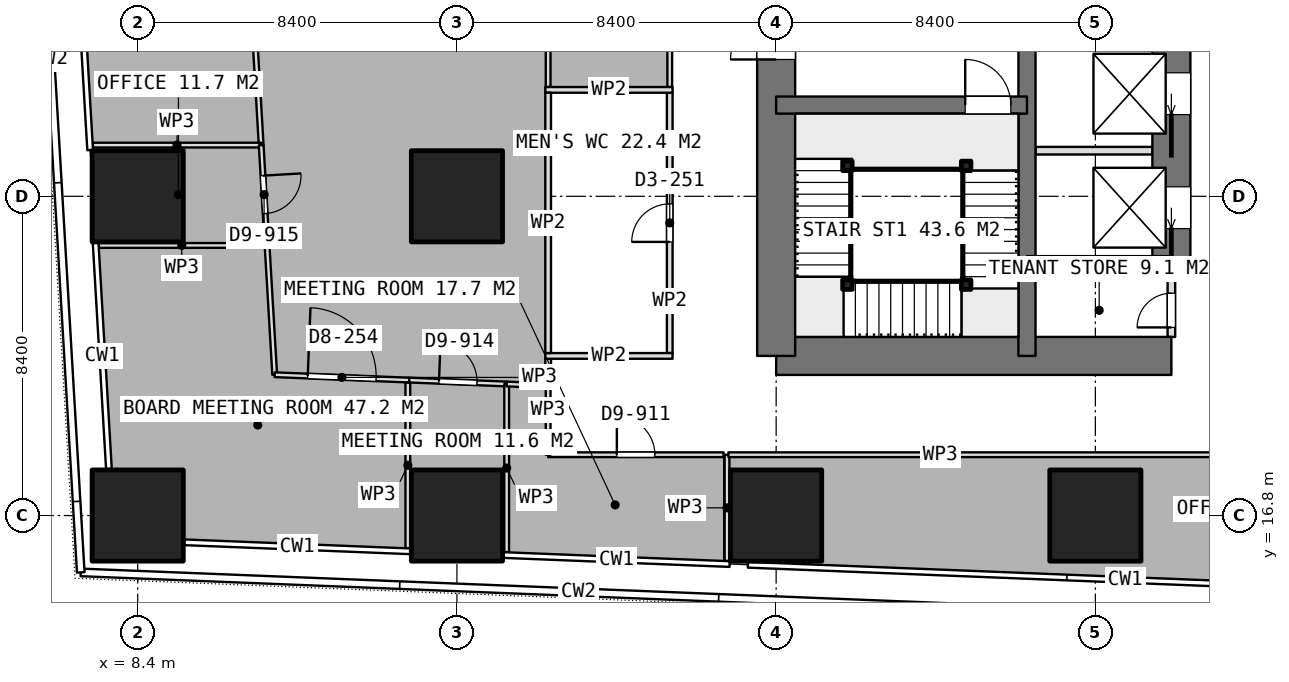
"""IFC4 building model, lengths in metres.
Left out: names, types, materials, properties, quantities, classifications, styles, units other than length and angle.
Written with IfcOpenShell. Run it as: python <this file> out.ifc"""

import sys

from ifc_helpers import new_model, si_unit, direction, frame, frame_2d, origin, origin_2d, place, context, subcontext, project, spatial, rectangle, extrude, element, fill, save


model = new_model("IFC4")
c1 = context("Model", 3, precision=1e-05, world=origin(), true_north=direction((0.0, 1.0)))
c2 = subcontext(c1, "Body", "Model", "MODEL_VIEW")
j1 = project(units=[si_unit("LENGTHUNIT", "METRE"), si_unit("PLANEANGLEUNIT", "RADIAN")], contexts=[c1])
p1 = place(None, origin())
s1 = spatial("IfcSite", under=j1, at=p1, CompositionType="ELEMENT")
p2 = place(p1, origin())
s2 = spatial("IfcBuilding", under=s1, at=p2, CompositionType="ELEMENT")
p3 = place(p2, frame((0.0, 0.0, 232.7)))
s3 = spatial("IfcBuildingStorey", under=s2, at=p3, CompositionType="ELEMENT", Elevation=232.7)
p4 = place(p3, frame((25.2, 21.0, 0.0), z_axis=(0.0, 0.0, 1.0), x_axis=(1.0, 0.0, 0.0)))
e1 = element("IfcWall", 1, at=p4, inside=s3, PredefinedType="SHEAR", context=c2, shape_type="SweptSolid", body=[
    extrude(rectangle(XDim=10.4, YDim=1.0, at=frame_2d((5.2, 0.0))), origin(), (0.0, 0.0, 1.0), 3.75),
])
p5 = place(p3, frame((25.2, 21.0, 0.0), z_axis=(0.0, 0.0, 1.0), x_axis=(0.0, 1.0, 0.0)))
e2 = element("IfcWall", 2, at=p5, inside=s3, PredefinedType="SHEAR", context=c2, shape_type="SweptSolid", body=[
    extrude(rectangle(XDim=25.2, YDim=1.0, at=frame_2d((12.6, 0.0))), origin(), (0.0, 0.0, 1.0), 3.75),
])
p6 = place(p5, frame((7.8, 0.0, 0.0)))
e3 = element("IfcOpeningElement", 3, at=p6, cuts=e2, PredefinedType="OPENING", context=c2, shape_type="SweptSolid", body=[
    extrude(rectangle(XDim=1.2, YDim=2.1, at=frame_2d((0.6, 1.05))), frame((0.0, 0.51, 0.0), z_axis=(0.0, -1.0, 0.0), x_axis=(1.0, 0.0, 0.0)), (0.0, 0.0, 1.0), 1.02),
])
p7 = place(p5, frame((14.25, 0.0, 0.0)))
e4 = element("IfcOpeningElement", 4, at=p7, cuts=e2, PredefinedType="OPENING", context=c2, shape_type="SweptSolid", body=[
    extrude(rectangle(XDim=0.9, YDim=2.1, at=frame_2d((0.45, 1.05))), frame((0.0, 0.51, 0.0), z_axis=(0.0, -1.0, 0.0), x_axis=(1.0, 0.0, 0.0)), (0.0, 0.0, 1.0), 1.02),
])
p8 = place(p5, frame((16.85, 0.0, 0.0)))
e5 = element("IfcOpeningElement", 5, at=p8, cuts=e2, PredefinedType="OPENING", context=c2, shape_type="SweptSolid", body=[
    extrude(rectangle(XDim=0.9, YDim=2.1, at=frame_2d((0.45, 1.05))), frame((0.0, 0.51, 0.0), z_axis=(0.0, -1.0, 0.0), x_axis=(1.0, 0.0, 0.0)), (0.0, 0.0, 1.0), 1.02),
])
p9 = place(p5, frame((19.025, 0.0, 0.0)))
e6 = element("IfcOpeningElement", 6, at=p9, cuts=e2, PredefinedType="OPENING", context=c2, shape_type="SweptSolid", body=[
    extrude(rectangle(XDim=1.2, YDim=2.1, at=frame_2d((0.6, 1.05))), frame((0.0, 0.51, 0.0), z_axis=(0.0, -1.0, 0.0), x_axis=(1.0, 0.0, 0.0)), (0.0, 0.0, 1.0), 1.02),
])
p10 = place(p3, frame((31.8, 21.0, 0.0), z_axis=(0.0, 0.0, 1.0), x_axis=(0.0, 1.0, 0.0)))
e7 = element("IfcWall", 7, at=p10, inside=s3, PredefinedType="SHEAR", context=c2, shape_type="SweptSolid", body=[
    extrude(rectangle(XDim=25.2, YDim=0.45, at=frame_2d((12.6, 0.0))), origin(), (0.0, 0.0, 1.0), 3.75),
])
p11 = place(p3, frame((35.6, 23.4, 0.0), z_axis=(0.0, 0.0, 1.0), x_axis=(0.0, 1.0, 0.0)))
e8 = element("IfcWall", 8, at=p11, inside=s3, PredefinedType="SHEAR", context=c2, shape_type="SweptSolid", body=[
    extrude(rectangle(XDim=18.0, YDim=1.0, at=frame_2d((9.0, 0.0))), origin(), (0.0, 0.0, 1.0), 3.75),
])
p12 = place(p11, frame((0.95, 0.0, 0.0)))
e9 = element("IfcOpeningElement", 9, at=p12, cuts=e8, PredefinedType="OPENING", context=c2, shape_type="SweptSolid", body=[
    extrude(rectangle(XDim=1.1, YDim=2.1, at=frame_2d((0.55, 1.05))), frame((0.0, 0.51, 0.0), z_axis=(0.0, -1.0, 0.0), x_axis=(1.0, 0.0, 0.0)), (0.0, 0.0, 1.0), 1.02),
])
p13 = place(p11, frame((3.95, 0.0, 0.0)))
e10 = element("IfcOpeningElement", 10, at=p13, cuts=e8, PredefinedType="OPENING", context=c2, shape_type="SweptSolid", body=[
    extrude(rectangle(XDim=1.1, YDim=2.1, at=frame_2d((0.55, 1.05))), frame((0.0, 0.51, 0.0), z_axis=(0.0, -1.0, 0.0), x_axis=(1.0, 0.0, 0.0)), (0.0, 0.0, 1.0), 1.02),
])
p14 = place(p11, frame((6.95, 0.0, 0.0)))
e11 = element("IfcOpeningElement", 11, at=p14, cuts=e8, PredefinedType="OPENING", context=c2, shape_type="SweptSolid", body=[
    extrude(rectangle(XDim=1.1, YDim=2.1, at=frame_2d((0.55, 1.05))), frame((0.0, 0.51, 0.0), z_axis=(0.0, -1.0, 0.0), x_axis=(1.0, 0.0, 0.0)), (0.0, 0.0, 1.0), 1.02),
])
p15 = place(p11, frame((9.95, 0.0, 0.0)))
e12 = element("IfcOpeningElement", 12, at=p15, cuts=e8, PredefinedType="OPENING", context=c2, shape_type="SweptSolid", body=[
    extrude(rectangle(XDim=1.1, YDim=2.1, at=frame_2d((0.55, 1.05))), frame((0.0, 0.51, 0.0), z_axis=(0.0, -1.0, 0.0), x_axis=(1.0, 0.0, 0.0)), (0.0, 0.0, 1.0), 1.02),
])
p16 = place(p11, frame((12.95, 0.0, 0.0)))
e13 = element("IfcOpeningElement", 13, at=p16, cuts=e8, PredefinedType="OPENING", context=c2, shape_type="SweptSolid", body=[
    extrude(rectangle(XDim=1.1, YDim=2.1, at=frame_2d((0.55, 1.05))), frame((0.0, 0.51, 0.0), z_axis=(0.0, -1.0, 0.0), x_axis=(1.0, 0.0, 0.0)), (0.0, 0.0, 1.0), 1.02),
])
p17 = place(p11, frame((15.95, 0.0, 0.0)))
e14 = element("IfcOpeningElement", 14, at=p17, cuts=e8, PredefinedType="OPENING", context=c2, shape_type="SweptSolid", body=[
    extrude(rectangle(XDim=1.1, YDim=2.1, at=frame_2d((0.55, 1.05))), frame((0.0, 0.51, 0.0), z_axis=(0.0, -1.0, 0.0), x_axis=(1.0, 0.0, 0.0)), (0.0, 0.0, 1.0), 1.02),
])
p18 = place(p3, frame((31.8, 23.4, 0.0), z_axis=(0.0, 0.0, 1.0), x_axis=(1.0, 0.0, 0.0)))
e15 = element("IfcWall", 15, at=p18, inside=s3, PredefinedType="SHEAR", context=c2, shape_type="SweptSolid", body=[
    extrude(rectangle(XDim=3.8, YDim=0.45, at=frame_2d((1.9, 0.0))), origin(), (0.0, 0.0, 1.0), 3.75),
])
p19 = place(p3, frame((25.2, 27.6, 0.0), z_axis=(0.0, 0.0, 1.0), x_axis=(1.0, 0.0, 0.0)))
e16 = element("IfcWall", 16, at=p19, inside=s3, PredefinedType="SHEAR", context=c2, shape_type="SweptSolid", body=[
    extrude(rectangle(XDim=6.6, YDim=0.45, at=frame_2d((3.3, 0.0))), origin(), (0.0, 0.0, 1.0), 3.75),
])
p20 = place(p19, frame((4.975, 0.0, 0.0)))
e17 = element("IfcOpeningElement", 17, at=p20, cuts=e16, PredefinedType="OPENING", context=c2, shape_type="SweptSolid", body=[
    extrude(rectangle(XDim=1.2, YDim=2.1, at=frame_2d((0.6, 1.05))), frame((0.0, 0.235, 0.0), z_axis=(0.0, -1.0, 0.0), x_axis=(1.0, 0.0, 0.0)), (0.0, 0.0, 1.0), 0.47),
])
for number, where, z_axis, x_axis in (
    (18, (8.4, 16.8, 0.0), (0.0, 0.0, 1.0), (1.0, 0.0, 0.0)),
    (19, (8.4, 25.2, 0.0), (0.0, 0.0, 1.0), (1.0, 0.0, 0.0)),
    (20, (16.8, 16.8, 0.0), (0.0, 0.0, 1.0), (1.0, 0.0, 0.0)),
    (21, (16.8, 25.2, 0.0), (0.0, 0.0, 1.0), (1.0, 0.0, 0.0)),
    (22, (25.2, 16.8, 0.0), (0.0, 0.0, 1.0), (1.0, 0.0, 0.0)),
    (23, (33.6, 16.8, 0.0), (0.0, 0.0, 1.0), (1.0, 0.0, 0.0)),
):
    element("IfcColumn", number, at=place(p3, frame(where, z_axis=z_axis, x_axis=x_axis)), inside=s3, PredefinedType="COLUMN", context=c2, shape_type="SweptSolid", body=[
        extrude(rectangle(XDim=2.4, YDim=2.4, at=origin_2d()), origin(), (0.0, 0.0, 1.0), 3.75),
    ])
p21 = place(p3, frame((32.025, 26.4, 0.0), z_axis=(0.0, 0.0, 1.0), x_axis=(1.0, 0.0, 0.0)))
e24 = element("IfcWall", 24, at=p21, inside=s3, PredefinedType="PARTITIONING", context=c2, shape_type="SweptSolid", body=[
    extrude(rectangle(XDim=3.075, YDim=0.2, at=frame_2d((1.538, 0.0))), origin(), (0.0, 0.0, 1.0), 3.5),
])
p22 = place(p3, frame((35.6, 21.5, 0.0), z_axis=(0.0, 0.0, 1.0), x_axis=(0.0, 1.0, 0.0)))
e25 = element("IfcWall", 25, at=p22, inside=s3, PredefinedType="PARTITIONING", context=c2, shape_type="SweptSolid", body=[
    extrude(rectangle(XDim=1.675, YDim=0.2, at=frame_2d((0.837, 0.0))), origin(), (0.0, 0.0, 1.0), 3.5),
])
p23 = place(p22, frame((0.25, 0.0, 0.0)))
e26 = element("IfcOpeningElement", 26, at=p23, cuts=e25, PredefinedType="OPENING", context=c2, shape_type="SweptSolid", body=[
    extrude(rectangle(XDim=0.9, YDim=2.1, at=frame_2d((0.45, 1.05))), frame((0.0, 0.11, 0.0), z_axis=(0.0, -1.0, 0.0), x_axis=(1.0, 0.0, 0.0)), (0.0, 0.0, 1.0), 0.22),
])
for number, where, z_axis, x_axis in (
    (27, (19.125, 21.0, 0.0), (0.0, 0.0, 1.0), (1.0, 0.0, 0.0)),
    (28, (19.125, 28.0, 0.0), (0.0, 0.0, 1.0), (1.0, 0.0, 0.0)),
):
    element("IfcWall", number, at=place(p3, frame(where, z_axis=z_axis, x_axis=x_axis)), inside=s3, PredefinedType="PARTITIONING", context=c2, shape_type="SweptSolid", body=[
        extrude(rectangle(XDim=3.35, YDim=0.15, at=frame_2d((1.675, 0.0))), origin(), (0.0, 0.0, 1.0), 3.5),
    ])
p24 = place(p3, frame((19.2, 21.075, 0.0), z_axis=(0.0, 0.0, 1.0), x_axis=(0.0, 1.0, 0.0)))
e29 = element("IfcWall", 29, at=p24, inside=s3, PredefinedType="PARTITIONING", context=c2, shape_type="SweptSolid", body=[
    extrude(rectangle(XDim=6.85, YDim=0.15, at=frame_2d((3.425, 0.0))), origin(), (0.0, 0.0, 1.0), 3.5),
])
p25 = place(p3, frame((22.4, 21.075, 0.0), z_axis=(0.0, 0.0, 1.0), x_axis=(0.0, 1.0, 0.0)))
e30 = element("IfcWall", 30, at=p25, inside=s3, PredefinedType="PARTITIONING", context=c2, shape_type="SweptSolid", body=[
    extrude(rectangle(XDim=6.85, YDim=0.15, at=frame_2d((3.425, 0.0))), origin(), (0.0, 0.0, 1.0), 3.5),
])
p26 = place(p25, frame((2.925, 0.0, 0.0)))
e31 = element("IfcOpeningElement", 31, at=p26, cuts=e30, PredefinedType="OPENING", context=c2, shape_type="SweptSolid", body=[
    extrude(rectangle(XDim=1.0, YDim=2.1, at=frame_2d((0.5, 1.05))), frame((0.0, 0.085, 0.0), z_axis=(0.0, -1.0, 0.0), x_axis=(1.0, 0.0, 0.0)), (0.0, 0.0, 1.0), 0.17),
])
p27 = place(p3, frame((23.907, 15.606, 0.0), z_axis=(0.0, 0.0, 1.0), x_axis=(0.0, 1.0, 0.0)))
e32 = element("IfcWall", 32, at=p27, inside=s3, PredefinedType="PARTITIONING", context=c2, shape_type="SweptSolid", body=[
    extrude(rectangle(XDim=2.794, YDim=0.125, at=frame_2d((1.397, 0.0))), origin(), (0.0, 0.0, 1.0), 3.5),
])
p28 = place(p3, frame((23.944, 18.4, 0.0), z_axis=(0.0, 0.0, 1.0), x_axis=(1.0, 0.0, 0.0)))
e33 = element("IfcWall", 33, at=p28, inside=s3, PredefinedType="PARTITIONING", context=c2, shape_type="SweptSolid", body=[
    extrude(rectangle(XDim=27.867, YDim=0.125, at=frame_2d((13.934, 0.0))), origin(), (0.0, 0.0, 1.0), 3.5),
])
p29 = place(p28, frame((13.433, 0.0, 0.0)))
e34 = element("IfcOpeningElement", 34, at=p29, cuts=e33, PredefinedType="OPENING", context=c2, shape_type="SweptSolid", body=[
    extrude(rectangle(XDim=1.0, YDim=2.1, at=frame_2d((0.5, 1.05))), frame((0.0, 0.073, 0.0), z_axis=(0.0, -1.0, 0.0), x_axis=(1.0, 0.0, 0.0)), (0.0, 0.0, 1.0), 0.145),
])
p30 = place(p3, frame((11.148, 35.06, 0.0), z_axis=(0.0, 0.0, 1.0), x_axis=(0.058747195918, -0.998272892035, 0.0)))
e35 = element("IfcWall", 35, at=p30, inside=s3, PredefinedType="PARTITIONING", context=c2, shape_type="SweptSolid", body=[
    extrude(rectangle(XDim=8.528, YDim=0.125, at=frame_2d((4.264, 0.0))), origin(), (0.0, 0.0, 1.0), 3.5),
])
p31 = place(p30, frame((3.364, 0.0, 0.0)))
e36 = element("IfcOpeningElement", 36, at=p31, cuts=e35, PredefinedType="OPENING", context=c2, shape_type="SweptSolid", body=[
    extrude(rectangle(XDim=1.8, YDim=2.1, at=frame_2d((0.9, 1.05))), frame((0.0, 0.073, 0.0), z_axis=(0.0, -1.0, 0.0), x_axis=(1.0, 0.0, 0.0)), (0.0, 0.0, 1.0), 0.145),
])
p32 = place(p3, frame((11.649, 26.547, 0.0), z_axis=(0.0, 0.0, 1.0), x_axis=(-1.0, 0.0, 0.0)))
e37 = element("IfcWall", 37, at=p32, inside=s3, PredefinedType="PARTITIONING", context=c2, shape_type="SweptSolid", body=[
    extrude(rectangle(XDim=4.428, YDim=0.125, at=frame_2d((2.214, 0.0))), origin(), (0.0, 0.0, 1.0), 3.5),
])
p33 = place(p3, frame((11.649, 26.546, 0.0), z_axis=(0.0, 0.0, 1.0), x_axis=(0.058711043696, -0.998275018894, 0.0)))
e38 = element("IfcWall", 38, at=p33, inside=s3, PredefinedType="PARTITIONING", context=c2, shape_type="SweptSolid", body=[
    extrude(rectangle(XDim=2.607, YDim=0.125, at=frame_2d((1.304, 0.0))), origin(), (0.0, 0.0, 1.0), 3.5),
])
p34 = place(p33, frame((0.804, 0.0, 0.0)))
e39 = element("IfcOpeningElement", 39, at=p34, cuts=e38, PredefinedType="OPENING", context=c2, shape_type="SweptSolid", body=[
    extrude(rectangle(XDim=1.0, YDim=2.1, at=frame_2d((0.5, 1.05))), frame((0.0, 0.073, 0.0), z_axis=(0.0, -1.0, 0.0), x_axis=(1.0, 0.0, 0.0)), (0.0, 0.0, 1.0), 0.145),
])
p35 = place(p3, frame((11.741, 23.907, 0.0), z_axis=(0.0, 0.0, 1.0), x_axis=(-1.0, 0.0, 0.0)))
e40 = element("IfcWall", 40, at=p35, inside=s3, PredefinedType="PARTITIONING", context=c2, shape_type="SweptSolid", body=[
    extrude(rectangle(XDim=4.364, YDim=0.125, at=frame_2d((2.182, 0.0))), origin(), (0.0, 0.0, 1.0), 3.5),
])
p36 = place(p3, frame((15.508, 20.303, 0.0), z_axis=(0.0, 0.0, 1.0), x_axis=(0.0, -1.0, 0.0)))
e41 = element("IfcWall", 41, at=p36, inside=s3, PredefinedType="PARTITIONING", context=c2, shape_type="SweptSolid", body=[
    extrude(rectangle(XDim=4.361, YDim=0.125, at=frame_2d((2.181, 0.0))), origin(), (0.0, 0.0, 1.0), 3.5),
])
p37 = place(p3, frame((11.802, 23.942, 0.0), z_axis=(0.0, 0.0, 1.0), x_axis=(0.058925701835, -0.998262371155, 0.0)))
e42 = element("IfcWall", 42, at=p37, inside=s3, PredefinedType="PARTITIONING", context=c2, shape_type="SweptSolid", body=[
    extrude(rectangle(XDim=3.443, YDim=0.125, at=frame_2d((1.722, 0.0))), origin(), (0.0, 0.0, 1.0), 3.5),
])
p38 = place(p3, frame((12.005, 20.505, 0.0), z_axis=(0.0, 0.0, 1.0), x_axis=(0.999208321211, -0.039783549637, 0.0)))
e43 = element("IfcWall", 43, at=p38, inside=s3, PredefinedType="PARTITIONING", context=c2, shape_type="SweptSolid", body=[
    extrude(rectangle(XDim=3.541, YDim=0.125, at=frame_2d((1.771, 0.0))), origin(), (0.0, 0.0, 1.0), 3.5),
])
p39 = place(p38, frame((0.87, 0.0, 0.0)))
e44 = element("IfcOpeningElement", 44, at=p39, cuts=e43, PredefinedType="OPENING", context=c2, shape_type="SweptSolid", body=[
    extrude(rectangle(XDim=1.8, YDim=2.1, at=frame_2d((0.9, 1.05))), frame((0.0, 0.073, 0.0), z_axis=(0.0, -1.0, 0.0), x_axis=(1.0, 0.0, 0.0)), (0.0, 0.0, 1.0), 0.145),
])
p40 = place(p3, frame((15.544, 20.364, 0.0), z_axis=(0.0, 0.0, 1.0), x_axis=(0.999194259908, -0.040135158736, 0.0)))
e45 = element("IfcWall", 45, at=p40, inside=s3, PredefinedType="PARTITIONING", context=c2, shape_type="SweptSolid", body=[
    extrude(rectangle(XDim=2.567, YDim=0.125, at=frame_2d((1.283, 0.0))), origin(), (0.0, 0.0, 1.0), 3.5),
])
p41 = place(p40, frame((0.784, 0.0, 0.0)))
e46 = element("IfcOpeningElement", 46, at=p41, cuts=e45, PredefinedType="OPENING", context=c2, shape_type="SweptSolid", body=[
    extrude(rectangle(XDim=1.0, YDim=2.1, at=frame_2d((0.5, 1.05))), frame((0.0, 0.073, 0.0), z_axis=(0.0, -1.0, 0.0), x_axis=(1.0, 0.0, 0.0)), (0.0, 0.0, 1.0), 0.145),
])
p42 = place(p3, frame((18.109, 20.261, 0.0), z_axis=(0.0, 0.0, 1.0), x_axis=(0.0, -1.0, 0.0)))
e47 = element("IfcWall", 47, at=p42, inside=s3, PredefinedType="PARTITIONING", context=c2, shape_type="SweptSolid", body=[
    extrude(rectangle(XDim=4.423, YDim=0.125, at=frame_2d((2.211, 0.0))), origin(), (0.0, 0.0, 1.0), 3.5),
])
p43 = place(p3, frame((19.2, 18.4, 0.0), z_axis=(0.0, 0.0, 1.0), x_axis=(1.0, 0.0, 0.0)))
e48 = element("IfcWall", 48, at=p43, inside=s3, PredefinedType="PARTITIONING", context=c2, shape_type="SweptSolid", body=[
    extrude(rectangle(XDim=4.617, YDim=0.125, at=frame_2d((2.309, 0.0))), origin(), (0.0, 0.0, 1.0), 3.5),
])
p44 = place(p43, frame((1.808, 0.0, 0.0)))
e49 = element("IfcOpeningElement", 49, at=p44, cuts=e48, PredefinedType="OPENING", context=c2, shape_type="SweptSolid", body=[
    extrude(rectangle(XDim=1.0, YDim=2.1, at=frame_2d((0.5, 1.05))), frame((0.0, 0.073, 0.0), z_axis=(0.0, -1.0, 0.0), x_axis=(1.0, 0.0, 0.0)), (0.0, 0.0, 1.0), 0.145),
])
p45 = place(p3, frame((18.11, 20.261, 0.0), z_axis=(0.0, 0.0, 1.0), x_axis=(0.999223679577, -0.039395915682, 0.0)))
e50 = element("IfcWall", 50, at=p45, inside=s3, PredefinedType="PARTITIONING", context=c2, shape_type="SweptSolid", body=[
    extrude(rectangle(XDim=1.091, YDim=0.125, at=frame_2d((0.545, 0.0))), origin(), (0.0, 0.0, 1.0), 3.5),
])
p46 = place(p3, frame((19.2, 20.218, 0.0), z_axis=(0.0, 0.0, 1.0), x_axis=(0.0, -1.0, 0.0)))
e51 = element("IfcWall", 51, at=p46, inside=s3, PredefinedType="PARTITIONING", context=c2, shape_type="SweptSolid", body=[
    extrude(rectangle(XDim=1.818, YDim=0.125, at=frame_2d((0.909, 0.0))), origin(), (0.0, 0.0, 1.0), 3.5),
])
p47 = place(p3, frame((19.2, 28.075, 0.0), z_axis=(0.0, 0.0, 1.0), x_axis=(0.0, 1.0, 0.0)))
e52 = element("IfcWall", 52, at=p47, inside=s3, PredefinedType="PARTITIONING", context=c2, shape_type="SweptSolid", body=[
    extrude(rectangle(XDim=25.075, YDim=0.125, at=frame_2d((12.538, 0.0))), origin(), (0.0, 0.0, 1.0), 3.5),
])
p48 = place(p3, frame((22.4, 53.15, 0.0), z_axis=(0.0, 0.0, 1.0), x_axis=(0.0, -1.0, 0.0)))
e53 = element("IfcWall", 53, at=p48, inside=s3, PredefinedType="PARTITIONING", context=c2, shape_type="SweptSolid", body=[
    extrude(rectangle(XDim=25.075, YDim=0.125, at=frame_2d((12.538, 0.0))), origin(), (0.0, 0.0, 1.0), 3.5),
])
p49 = place(p48, frame((11.675, 0.0, 0.0)))
e54 = element("IfcOpeningElement", 54, at=p49, cuts=e53, PredefinedType="OPENING", context=c2, shape_type="SweptSolid", body=[
    extrude(rectangle(XDim=1.8, YDim=2.1, at=frame_2d((0.9, 1.05))), frame((0.0, 0.073, 0.0), z_axis=(0.0, -1.0, 0.0), x_axis=(1.0, 0.0, 0.0)), (0.0, 0.0, 1.0), 0.145),
])
p50 = place(p3, frame((19.2, 20.925, 0.0), z_axis=(0.0, 0.0, 1.0), x_axis=(0.0, -1.0, 0.0)))
e55 = element("IfcWall", 55, at=p50, inside=s3, PredefinedType="PARTITIONING", context=c2, shape_type="SweptSolid", body=[
    extrude(rectangle(XDim=0.707, YDim=0.15, at=frame_2d((0.354, 0.0))), origin(), (0.0, 0.0, 1.0), 3.5),
])
for number, where, z_axis, x_axis in (
    (56, (30.2, 26.0, 0.0), (0.0, 0.0, 1.0), (1.0, 0.0, 0.0)),
    (57, (30.2, 22.875, 0.0), (0.0, 0.0, 1.0), (1.0, 0.0, 0.0)),
    (58, (27.075, 22.875, 0.0), (0.0, 0.0, 1.0), (1.0, 0.0, 0.0)),
    (59, (27.075, 26.0, 0.0), (0.0, 0.0, 1.0), (1.0, 0.0, 0.0)),
):
    element("IfcColumn", number, at=place(p3, frame(where, z_axis=z_axis, x_axis=x_axis)), inside=s3, PredefinedType="COLUMN", context=c2, shape_type="SweptSolid", body=[
        extrude(rectangle(XDim=0.25, YDim=0.25, at=origin_2d()), origin(), (0.0, 0.0, 1.0), 3.75),
    ])
p51 = place(p6, origin())
e60 = element("IfcDoor", 60, at=p51, inside=s3, OperationType="SINGLE_SWING_LEFT", PredefinedType="DOOR", context=c2, shape_type="SweptSolid", body=[
    extrude(rectangle(XDim=1.2, YDim=2.1, at=frame_2d((0.6, 1.05))), frame((0.0, 0.025, 0.0), z_axis=(0.0, -1.0, 0.0), x_axis=(1.0, 0.0, 0.0)), (0.0, 0.0, 1.0), 0.05),
])
fill(e3, e60)
p52 = place(p23, origin())
e61 = element("IfcDoor", 61, at=p52, inside=s3, OperationType="SINGLE_SWING_LEFT", PredefinedType="DOOR", context=c2, shape_type="SweptSolid", body=[
    extrude(rectangle(XDim=0.9, YDim=2.1, at=frame_2d((0.45, 1.05))), frame((0.0, 0.025, 0.0), z_axis=(0.0, -1.0, 0.0), x_axis=(1.0, 0.0, 0.0)), (0.0, 0.0, 1.0), 0.05),
])
fill(e26, e61)
p53 = place(p12, origin())
e62 = element("IfcDoor", 62, at=p53, inside=s3, OperationType="SLIDING_TO_LEFT", PredefinedType="USERDEFINED", context=c2, shape_type="SweptSolid", body=[
    extrude(rectangle(XDim=1.1, YDim=2.1, at=frame_2d((0.55, 1.05))), frame((0.0, 0.025, 0.0), z_axis=(0.0, -1.0, 0.0), x_axis=(1.0, 0.0, 0.0)), (0.0, 0.0, 1.0), 0.05),
])
fill(e9, e62)
p54 = place(p13, origin())
e63 = element("IfcDoor", 63, at=p54, inside=s3, OperationType="SLIDING_TO_LEFT", PredefinedType="USERDEFINED", context=c2, shape_type="SweptSolid", body=[
    extrude(rectangle(XDim=1.1, YDim=2.1, at=frame_2d((0.55, 1.05))), frame((0.0, 0.025, 0.0), z_axis=(0.0, -1.0, 0.0), x_axis=(1.0, 0.0, 0.0)), (0.0, 0.0, 1.0), 0.05),
])
fill(e10, e63)
p55 = place(p26, origin())
e64 = element("IfcDoor", 64, at=p55, inside=s3, OperationType="SINGLE_SWING_LEFT", PredefinedType="DOOR", context=c2, shape_type="SweptSolid", body=[
    extrude(rectangle(XDim=1.0, YDim=2.1, at=frame_2d((0.5, 1.05))), frame((0.0, 0.025, 0.0), z_axis=(0.0, -1.0, 0.0), x_axis=(1.0, 0.0, 0.0)), (0.0, 0.0, 1.0), 0.05),
])
fill(e31, e64)
p56 = place(p34, origin())
e65 = element("IfcDoor", 65, at=p56, inside=s3, OperationType="SINGLE_SWING_LEFT", PredefinedType="DOOR", context=c2, shape_type="SweptSolid", body=[
    extrude(rectangle(XDim=1.0, YDim=2.1, at=frame_2d((0.5, 1.05))), frame((0.0, 0.025, 0.0), z_axis=(0.0, -1.0, 0.0), x_axis=(1.0, 0.0, 0.0)), (0.0, 0.0, 1.0), 0.05),
])
fill(e39, e65)
p57 = place(p39, origin())
e66 = element("IfcDoor", 66, at=p57, inside=s3, OperationType="DOUBLE_DOOR_SINGLE_SWING", PredefinedType="DOOR", context=c2, shape_type="SweptSolid", body=[
    extrude(rectangle(XDim=1.8, YDim=2.1, at=frame_2d((0.9, 1.05))), frame((0.0, 0.025, 0.0), z_axis=(0.0, -1.0, 0.0), x_axis=(1.0, 0.0, 0.0)), (0.0, 0.0, 1.0), 0.05),
])
fill(e44, e66)
p58 = place(p41, origin())
e67 = element("IfcDoor", 67, at=p58, inside=s3, OperationType="SINGLE_SWING_LEFT", PredefinedType="DOOR", context=c2, shape_type="SweptSolid", body=[
    extrude(rectangle(XDim=1.0, YDim=2.1, at=frame_2d((0.5, 1.05))), frame((0.0, 0.025, 0.0), z_axis=(0.0, -1.0, 0.0), x_axis=(1.0, 0.0, 0.0)), (0.0, 0.0, 1.0), 0.05),
])
fill(e46, e67)
p59 = place(p44, origin())
e68 = element("IfcDoor", 68, at=p59, inside=s3, OperationType="SINGLE_SWING_LEFT", PredefinedType="DOOR", context=c2, shape_type="SweptSolid", body=[
    extrude(rectangle(XDim=1.0, YDim=2.1, at=frame_2d((0.5, 1.05))), frame((0.0, 0.025, 0.0), z_axis=(0.0, -1.0, 0.0), x_axis=(1.0, 0.0, 0.0)), (0.0, 0.0, 1.0), 0.05),
])
fill(e49, e68)
p60 = place(p20, origin())
e69 = element("IfcDoor", 69, at=p60, inside=s3, OperationType="SINGLE_SWING_RIGHT", PredefinedType="DOOR", context=c2, shape_type="SweptSolid", body=[
    extrude(rectangle(XDim=1.2, YDim=2.1, at=frame_2d((0.6, 1.05))), frame((0.0, 0.025, 0.0), z_axis=(0.0, -1.0, 0.0), x_axis=(1.0, 0.0, 0.0)), (0.0, 0.0, 1.0), 0.05),
])
fill(e17, e69)
save(model, sys.argv[1])
